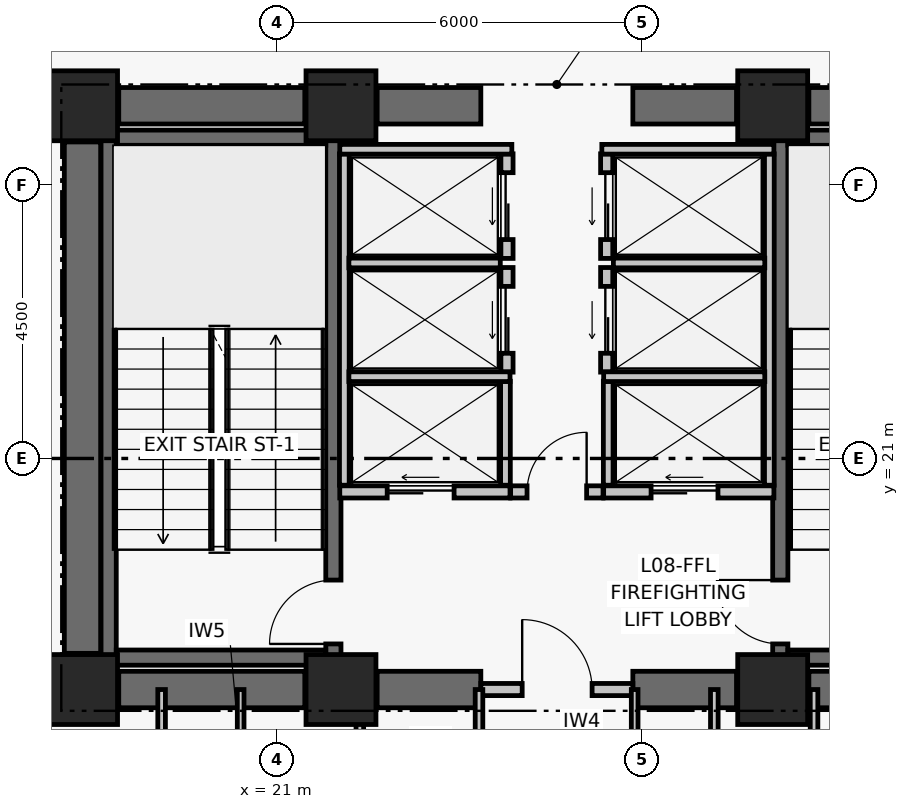
"""IFC4 building model, lengths in metres.
Left out: names, types, materials, properties, quantities, classifications, styles, units other than length and angle.
Written with IfcOpenShell. Run it as: python <this file> out.ifc"""

import sys

from ifc_helpers import new_model, si_unit, direction, frame, frame_2d, origin, origin_2d, place, context, subcontext, project, spatial, rectangle, extrude, element, fill, save


model = new_model("IFC4")
c1 = context("Model", 3, precision=1e-05, world=origin(), true_north=direction((0.0, 1.0)))
c2 = subcontext(c1, "Body", "Model", "MODEL_VIEW")
j1 = project(units=[si_unit("LENGTHUNIT", "METRE"), si_unit("PLANEANGLEUNIT", "RADIAN")], contexts=[c1])
p1 = place(None, origin())
s1 = spatial("IfcSite", under=j1, at=p1, CompositionType="ELEMENT")
p2 = place(p1, origin())
s2 = spatial("IfcBuilding", under=s1, at=p2, CompositionType="ELEMENT")
p3 = place(p2, frame((0.0, 0.0, 38.76)))
s3 = spatial("IfcBuildingStorey", under=s2, at=p3, CompositionType="ELEMENT", Elevation=38.76)
for number, where, z_axis, x_axis in (
    (1, (17.8, 17.2, 0.0), (0.0, 0.0, 1.0), (1.0, 0.0, 0.0)),
    (2, (22.05, 17.2, 0.0), (0.0, 0.0, 1.0), (1.0, 0.0, 0.0)),
    (3, (29.15, 17.2, 0.0), (0.0, 0.0, 1.0), (1.0, 0.0, 0.0)),
    (4, (17.8, 26.8, 0.0), (0.0, 0.0, 1.0), (1.0, 0.0, 0.0)),
    (5, (22.05, 26.8, 0.0), (0.0, 0.0, 1.0), (1.0, 0.0, 0.0)),
    (6, (29.15, 26.8, 0.0), (0.0, 0.0, 1.0), (1.0, 0.0, 0.0)),
):
    element("IfcColumn", number, at=place(p3, frame(where, z_axis=z_axis, x_axis=x_axis)), inside=s3, PredefinedType="COLUMN", context=c2, shape_type="SweptSolid", body=[
        extrude(rectangle(XDim=1.15, YDim=1.15, at=origin_2d()), origin(), (0.0, 0.0, 1.0), 3.72),
    ])
p4 = place(p3, frame((18.395, 17.2, 0.0), z_axis=(0.0, 0.0, 1.0), x_axis=(1.0, 0.0, 0.0)))
e7 = element("IfcWall", 7, at=p4, inside=s3, PredefinedType="SHEAR", context=c2, shape_type="SweptSolid", body=[
    extrude(rectangle(XDim=3.06, YDim=0.6, at=frame_2d((1.53, 0.0))), origin(), (0.0, 0.0, 1.0), 3.47),
])
p5 = place(p3, frame((22.645, 17.2, 0.0), z_axis=(0.0, 0.0, 1.0), x_axis=(1.0, 0.0, 0.0)))
e8 = element("IfcWall", 8, at=p5, inside=s3, PredefinedType="SHEAR", context=c2, shape_type="SweptSolid", body=[
    extrude(rectangle(XDim=1.705, YDim=0.6, at=frame_2d((0.853, 0.0))), origin(), (0.0, 0.0, 1.0), 3.47),
])
p6 = place(p3, frame((26.85, 17.2, 0.0), z_axis=(0.0, 0.0, 1.0), x_axis=(1.0, 0.0, 0.0)))
e9 = element("IfcWall", 9, at=p6, inside=s3, PredefinedType="SHEAR", context=c2, shape_type="SweptSolid", body=[
    extrude(rectangle(XDim=1.705, YDim=0.6, at=frame_2d((0.853, 0.0))), origin(), (0.0, 0.0, 1.0), 3.47),
])
p7 = place(p3, frame((29.745, 17.2, 0.0), z_axis=(0.0, 0.0, 1.0), x_axis=(1.0, 0.0, 0.0)))
e10 = element("IfcWall", 10, at=p7, inside=s3, PredefinedType="SHEAR", context=c2, shape_type="SweptSolid", body=[
    extrude(rectangle(XDim=3.06, YDim=0.6, at=frame_2d((1.53, 0.0))), origin(), (0.0, 0.0, 1.0), 3.47),
])
p8 = place(p3, frame((18.395, 26.8, 0.0), z_axis=(0.0, 0.0, 1.0), x_axis=(1.0, 0.0, 0.0)))
e11 = element("IfcWall", 11, at=p8, inside=s3, PredefinedType="SHEAR", context=c2, shape_type="SweptSolid", body=[
    extrude(rectangle(XDim=3.06, YDim=0.6, at=frame_2d((1.53, 0.0))), origin(), (0.0, 0.0, 1.0), 3.47),
])
p9 = place(p3, frame((22.645, 26.8, 0.0), z_axis=(0.0, 0.0, 1.0), x_axis=(1.0, 0.0, 0.0)))
e12 = element("IfcWall", 12, at=p9, inside=s3, PredefinedType="SHEAR", context=c2, shape_type="SweptSolid", body=[
    extrude(rectangle(XDim=1.705, YDim=0.6, at=frame_2d((0.853, 0.0))), origin(), (0.0, 0.0, 1.0), 3.47),
])
p10 = place(p3, frame((26.85, 26.8, 0.0), z_axis=(0.0, 0.0, 1.0), x_axis=(1.0, 0.0, 0.0)))
e13 = element("IfcWall", 13, at=p10, inside=s3, PredefinedType="SHEAR", context=c2, shape_type="SweptSolid", body=[
    extrude(rectangle(XDim=1.705, YDim=0.6, at=frame_2d((0.853, 0.0))), origin(), (0.0, 0.0, 1.0), 3.47),
])
p11 = place(p3, frame((29.745, 26.8, 0.0), z_axis=(0.0, 0.0, 1.0), x_axis=(1.0, 0.0, 0.0)))
e14 = element("IfcWall", 14, at=p11, inside=s3, PredefinedType="SHEAR", context=c2, shape_type="SweptSolid", body=[
    extrude(rectangle(XDim=3.06, YDim=0.6, at=frame_2d((1.53, 0.0))), origin(), (0.0, 0.0, 1.0), 3.47),
])
p12 = place(p3, frame((17.8, 17.795, 0.0), z_axis=(0.0, 0.0, 1.0), x_axis=(0.0, 1.0, 0.0)))
e15 = element("IfcWall", 15, at=p12, inside=s3, PredefinedType="SHEAR", context=c2, shape_type="SweptSolid", body=[
    extrude(rectangle(XDim=8.41, YDim=0.6, at=frame_2d((4.205, 0.0))), origin(), (0.0, 0.0, 1.0), 3.47),
])
p13 = place(p3, frame((18.229, 17.6, 0.0), z_axis=(0.0, 0.0, 1.0), x_axis=(0.0, 1.0, 0.0)))
e16 = element("IfcWall", 16, at=p13, inside=s3, PredefinedType="SHEAR", context=c2, shape_type="SweptSolid", body=[
    extrude(rectangle(XDim=8.8, YDim=0.25, at=frame_2d((4.4, 0.0))), origin(), (0.0, 0.0, 1.0), 3.47),
])
p14 = place(p3, frame((21.925, 17.6, 0.0), z_axis=(0.0, 0.0, 1.0), x_axis=(0.0, 1.0, 0.0)))
e17 = element("IfcWall", 17, at=p14, inside=s3, PredefinedType="SHEAR", context=c2, shape_type="SweptSolid", body=[
    extrude(rectangle(XDim=8.8, YDim=0.25, at=frame_2d((4.4, 0.0))), origin(), (0.0, 0.0, 1.0), 3.47),
])
p15 = place(p14, frame((0.35, 0.0, 0.0)))
e18 = element("IfcOpeningElement", 18, at=p15, cuts=e17, PredefinedType="OPENING", context=c2, shape_type="SweptSolid", body=[
    extrude(rectangle(XDim=1.05, YDim=2.08, at=frame_2d((0.525, 1.04))), frame((0.0, 0.135, 0.0), z_axis=(0.0, -1.0, 0.0), x_axis=(1.0, 0.0, 0.0)), (0.0, 0.0, 1.0), 0.27),
])
for number, where, z_axis, x_axis in (
    (19, (18.354, 17.725, 0.0), (0.0, 0.0, 1.0), (1.0, 0.0, 0.0)),
    (20, (18.354, 26.275, 0.0), (0.0, 0.0, 1.0), (1.0, 0.0, 0.0)),
):
    element("IfcWall", number, at=place(p3, frame(where, z_axis=z_axis, x_axis=x_axis)), inside=s3, PredefinedType="SHEAR", context=c2, shape_type="SweptSolid", body=[
        extrude(rectangle(XDim=3.446, YDim=0.25, at=frame_2d((1.723, 0.0))), origin(), (0.0, 0.0, 1.0), 3.47),
    ])
p16 = place(p3, frame((29.275, 17.6, 0.0), z_axis=(0.0, 0.0, 1.0), x_axis=(0.0, 1.0, 0.0)))
e21 = element("IfcWall", 21, at=p16, inside=s3, PredefinedType="SHEAR", context=c2, shape_type="SweptSolid", body=[
    extrude(rectangle(XDim=8.8, YDim=0.25, at=frame_2d((4.4, 0.0))), origin(), (0.0, 0.0, 1.0), 3.47),
])
p17 = place(p16, frame((0.35, 0.0, 0.0)))
e22 = element("IfcOpeningElement", 22, at=p17, cuts=e21, PredefinedType="OPENING", context=c2, shape_type="SweptSolid", body=[
    extrude(rectangle(XDim=1.05, YDim=2.08, at=frame_2d((0.525, 1.04))), frame((0.0, 0.135, 0.0), z_axis=(0.0, -1.0, 0.0), x_axis=(1.0, 0.0, 0.0)), (0.0, 0.0, 1.0), 0.27),
])
for number, where, z_axis, x_axis in (
    (23, (29.4, 17.725, 0.0), (0.0, 0.0, 1.0), (1.0, 0.0, 0.0)),
    (24, (29.4, 26.275, 0.0), (0.0, 0.0, 1.0), (1.0, 0.0, 0.0)),
):
    element("IfcWall", number, at=place(p3, frame(where, z_axis=z_axis, x_axis=x_axis)), inside=s3, PredefinedType="SHEAR", context=c2, shape_type="SweptSolid", body=[
        extrude(rectangle(XDim=3.446, YDim=0.25, at=frame_2d((1.723, 0.0))), origin(), (0.0, 0.0, 1.0), 3.47),
    ])
p18 = place(p3, frame((24.35, 17.2, 0.0), z_axis=(0.0, 0.0, 1.0), x_axis=(1.0, 0.0, 0.0)))
e25 = element("IfcWall", 25, at=p18, inside=s3, PredefinedType="PARTITIONING", context=c2, shape_type="SweptSolid", body=[
    extrude(rectangle(XDim=2.5, YDim=0.2, at=frame_2d((1.25, 0.0))), origin(), (0.0, 0.0, 1.0), 2.6),
])
p19 = place(p18, frame((0.68, 0.0, 0.0)))
e26 = element("IfcOpeningElement", 26, at=p19, cuts=e25, PredefinedType="OPENING", context=c2, shape_type="SweptSolid", body=[
    extrude(rectangle(XDim=1.15, YDim=2.08, at=frame_2d((0.575, 1.04))), frame((0.0, 0.11, 0.0), z_axis=(0.0, -1.0, 0.0), x_axis=(1.0, 0.0, 0.0)), (0.0, 0.0, 1.0), 0.22),
])
p20 = place(p3, frame((24.84, 20.45, 0.0), z_axis=(0.0, 0.0, 1.0), x_axis=(1.0, 0.0, 0.0)))
e27 = element("IfcWall", 27, at=p20, inside=s3, PredefinedType="PARTITIONING", context=c2, shape_type="SweptSolid", body=[
    extrude(rectangle(XDim=1.52, YDim=0.2, at=frame_2d((0.76, 0.0))), origin(), (0.0, 0.0, 1.0), 3.47),
])
p21 = place(p20, frame((0.27, 0.0, 0.0)))
e28 = element("IfcOpeningElement", 28, at=p21, cuts=e27, PredefinedType="OPENING", context=c2, shape_type="SweptSolid", body=[
    extrude(rectangle(XDim=0.98, YDim=2.06, at=frame_2d((0.49, 1.03))), frame((0.0, 0.11, 0.0), z_axis=(0.0, -1.0, 0.0), x_axis=(1.0, 0.0, 0.0)), (0.0, 0.0, 1.0), 0.22),
])
p22 = place(p3, frame((22.03, 20.45, 0.0), z_axis=(0.0, 0.0, 1.0), x_axis=(1.0, 0.0, 0.0)))
e29 = element("IfcWall", 29, at=p22, inside=s3, PredefinedType="PARTITIONING", context=c2, shape_type="SweptSolid", body=[
    extrude(rectangle(XDim=2.8, YDim=0.2, at=frame_2d((1.4, 0.0))), origin(), (0.0, 0.0, 1.0), 3.47),
])
p23 = place(p22, frame((0.78, 0.0, 0.0)))
e30 = element("IfcOpeningElement", 30, at=p23, cuts=e29, PredefinedType="OPENING", context=c2, shape_type="SweptSolid", body=[
    extrude(rectangle(XDim=1.1, YDim=2.08, at=frame_2d((0.55, 1.04))), frame((0.0, 0.11, 0.0), z_axis=(0.0, -1.0, 0.0), x_axis=(1.0, 0.0, 0.0)), (0.0, 0.0, 1.0), 0.22),
])
p24 = place(p3, frame((26.37, 20.45, 0.0), z_axis=(0.0, 0.0, 1.0), x_axis=(1.0, 0.0, 0.0)))
e31 = element("IfcWall", 31, at=p24, inside=s3, PredefinedType="PARTITIONING", context=c2, shape_type="SweptSolid", body=[
    extrude(rectangle(XDim=2.8, YDim=0.2, at=frame_2d((1.4, 0.0))), origin(), (0.0, 0.0, 1.0), 3.47),
])
p25 = place(p24, frame((0.78, 0.0, 0.0)))
e32 = element("IfcOpeningElement", 32, at=p25, cuts=e31, PredefinedType="OPENING", context=c2, shape_type="SweptSolid", body=[
    extrude(rectangle(XDim=1.1, YDim=2.08, at=frame_2d((0.55, 1.04))), frame((0.0, 0.11, 0.0), z_axis=(0.0, -1.0, 0.0), x_axis=(1.0, 0.0, 0.0)), (0.0, 0.0, 1.0), 0.22),
])
p26 = place(p3, frame((24.78, 22.42, 0.0), z_axis=(0.0, 0.0, 1.0), x_axis=(0.0, 1.0, 0.0)))
e33 = element("IfcWall", 33, at=p26, inside=s3, PredefinedType="PARTITIONING", context=c2, shape_type="SweptSolid", body=[
    extrude(rectangle(XDim=1.72, YDim=0.2, at=frame_2d((0.86, 0.0))), origin(), (0.0, 0.0, 1.0), 3.47),
])
p27 = place(p26, frame((0.31, 0.0, 0.0)))
e34 = element("IfcOpeningElement", 34, at=p27, cuts=e33, PredefinedType="OPENING", context=c2, shape_type="SweptSolid", body=[
    extrude(rectangle(XDim=1.1, YDim=2.08, at=frame_2d((0.55, 1.04))), frame((0.0, 0.11, 0.0), z_axis=(0.0, -1.0, 0.0), x_axis=(1.0, 0.0, 0.0)), (0.0, 0.0, 1.0), 0.22),
])
p28 = place(p3, frame((24.78, 24.29, 0.0), z_axis=(0.0, 0.0, 1.0), x_axis=(0.0, 1.0, 0.0)))
e35 = element("IfcWall", 35, at=p28, inside=s3, PredefinedType="PARTITIONING", context=c2, shape_type="SweptSolid", body=[
    extrude(rectangle(XDim=1.72, YDim=0.2, at=frame_2d((0.86, 0.0))), origin(), (0.0, 0.0, 1.0), 3.47),
])
p29 = place(p28, frame((0.31, 0.0, 0.0)))
e36 = element("IfcOpeningElement", 36, at=p29, cuts=e35, PredefinedType="OPENING", context=c2, shape_type="SweptSolid", body=[
    extrude(rectangle(XDim=1.1, YDim=2.08, at=frame_2d((0.55, 1.04))), frame((0.0, 0.11, 0.0), z_axis=(0.0, -1.0, 0.0), x_axis=(1.0, 0.0, 0.0)), (0.0, 0.0, 1.0), 0.22),
])
p30 = place(p3, frame((26.42, 22.42, 0.0), z_axis=(0.0, 0.0, 1.0), x_axis=(0.0, 1.0, 0.0)))
e37 = element("IfcWall", 37, at=p30, inside=s3, PredefinedType="PARTITIONING", context=c2, shape_type="SweptSolid", body=[
    extrude(rectangle(XDim=1.72, YDim=0.2, at=frame_2d((0.86, 0.0))), origin(), (0.0, 0.0, 1.0), 3.47),
])
p31 = place(p30, frame((0.31, 0.0, 0.0)))
e38 = element("IfcOpeningElement", 38, at=p31, cuts=e37, PredefinedType="OPENING", context=c2, shape_type="SweptSolid", body=[
    extrude(rectangle(XDim=1.1, YDim=2.08, at=frame_2d((0.55, 1.04))), frame((0.0, 0.11, 0.0), z_axis=(0.0, -1.0, 0.0), x_axis=(1.0, 0.0, 0.0)), (0.0, 0.0, 1.0), 0.22),
])
p32 = place(p3, frame((26.42, 24.29, 0.0), z_axis=(0.0, 0.0, 1.0), x_axis=(0.0, 1.0, 0.0)))
e39 = element("IfcWall", 39, at=p32, inside=s3, PredefinedType="PARTITIONING", context=c2, shape_type="SweptSolid", body=[
    extrude(rectangle(XDim=1.72, YDim=0.2, at=frame_2d((0.86, 0.0))), origin(), (0.0, 0.0, 1.0), 3.47),
])
p33 = place(p32, frame((0.31, 0.0, 0.0)))
e40 = element("IfcOpeningElement", 40, at=p33, cuts=e39, PredefinedType="OPENING", context=c2, shape_type="SweptSolid", body=[
    extrude(rectangle(XDim=1.1, YDim=2.08, at=frame_2d((0.55, 1.04))), frame((0.0, 0.11, 0.0), z_axis=(0.0, -1.0, 0.0), x_axis=(1.0, 0.0, 0.0)), (0.0, 0.0, 1.0), 0.22),
])
p34 = place(p3, frame((22.105, 20.56, 0.0), z_axis=(0.0, 0.0, 1.0), x_axis=(0.0, 1.0, 0.0)))
e41 = element("IfcWall", 41, at=p34, inside=s3, PredefinedType="PARTITIONING", context=c2, shape_type="SweptSolid", body=[
    extrude(rectangle(XDim=5.45, YDim=0.16, at=frame_2d((2.725, 0.0))), origin(), (0.0, 0.0, 1.0), 3.47),
])
p35 = place(p3, frame((24.755, 20.56, 0.0), z_axis=(0.0, 0.0, 1.0), x_axis=(0.0, 1.0, 0.0)))
e42 = element("IfcWall", 42, at=p35, inside=s3, PredefinedType="PARTITIONING", context=c2, shape_type="SweptSolid", body=[
    extrude(rectangle(XDim=1.71, YDim=0.16, at=frame_2d((0.855, 0.0))), origin(), (0.0, 0.0, 1.0), 3.47),
])
p36 = place(p3, frame((22.18, 22.345, 0.0), z_axis=(0.0, 0.0, 1.0), x_axis=(1.0, 0.0, 0.0)))
e43 = element("IfcWall", 43, at=p36, inside=s3, PredefinedType="PARTITIONING", context=c2, shape_type="SweptSolid", body=[
    extrude(rectangle(XDim=2.65, YDim=0.16, at=frame_2d((1.325, 0.0))), origin(), (0.0, 0.0, 1.0), 3.47),
])
p37 = place(p3, frame((22.18, 24.215, 0.0), z_axis=(0.0, 0.0, 1.0), x_axis=(1.0, 0.0, 0.0)))
e44 = element("IfcWall", 44, at=p37, inside=s3, PredefinedType="PARTITIONING", context=c2, shape_type="SweptSolid", body=[
    extrude(rectangle(XDim=2.49, YDim=0.16, at=frame_2d((1.245, 0.0))), origin(), (0.0, 0.0, 1.0), 3.47),
])
p38 = place(p3, frame((22.03, 26.085, 0.0), z_axis=(0.0, 0.0, 1.0), x_axis=(1.0, 0.0, 0.0)))
e45 = element("IfcWall", 45, at=p38, inside=s3, PredefinedType="PARTITIONING", context=c2, shape_type="SweptSolid", body=[
    extrude(rectangle(XDim=2.83, YDim=0.16, at=frame_2d((1.415, 0.0))), origin(), (0.0, 0.0, 1.0), 3.47),
])
p39 = place(p3, frame((29.095, 20.56, 0.0), z_axis=(0.0, 0.0, 1.0), x_axis=(0.0, 1.0, 0.0)))
e46 = element("IfcWall", 46, at=p39, inside=s3, PredefinedType="PARTITIONING", context=c2, shape_type="SweptSolid", body=[
    extrude(rectangle(XDim=5.45, YDim=0.16, at=frame_2d((2.725, 0.0))), origin(), (0.0, 0.0, 1.0), 3.47),
])
p40 = place(p3, frame((26.445, 20.56, 0.0), z_axis=(0.0, 0.0, 1.0), x_axis=(0.0, 1.0, 0.0)))
e47 = element("IfcWall", 47, at=p40, inside=s3, PredefinedType="PARTITIONING", context=c2, shape_type="SweptSolid", body=[
    extrude(rectangle(XDim=1.71, YDim=0.16, at=frame_2d((0.855, 0.0))), origin(), (0.0, 0.0, 1.0), 3.47),
])
p41 = place(p3, frame((26.37, 22.345, 0.0), z_axis=(0.0, 0.0, 1.0), x_axis=(1.0, 0.0, 0.0)))
e48 = element("IfcWall", 48, at=p41, inside=s3, PredefinedType="PARTITIONING", context=c2, shape_type="SweptSolid", body=[
    extrude(rectangle(XDim=2.65, YDim=0.16, at=frame_2d((1.325, 0.0))), origin(), (0.0, 0.0, 1.0), 3.47),
])
p42 = place(p3, frame((26.53, 24.215, 0.0), z_axis=(0.0, 0.0, 1.0), x_axis=(1.0, 0.0, 0.0)))
e49 = element("IfcWall", 49, at=p42, inside=s3, PredefinedType="PARTITIONING", context=c2, shape_type="SweptSolid", body=[
    extrude(rectangle(XDim=2.49, YDim=0.16, at=frame_2d((1.245, 0.0))), origin(), (0.0, 0.0, 1.0), 3.47),
])
p43 = place(p3, frame((26.34, 26.085, 0.0), z_axis=(0.0, 0.0, 1.0), x_axis=(1.0, 0.0, 0.0)))
e50 = element("IfcWall", 50, at=p43, inside=s3, PredefinedType="PARTITIONING", context=c2, shape_type="SweptSolid", body=[
    extrude(rectangle(XDim=2.83, YDim=0.16, at=frame_2d((1.415, 0.0))), origin(), (0.0, 0.0, 1.0), 3.47),
])
p44 = place(p3, frame((19.1, 14.95, 0.0), z_axis=(0.0, 0.0, 1.0), x_axis=(0.0, 1.0, 0.0)))
e51 = element("IfcWall", 51, at=p44, inside=s3, PredefinedType="PARTITIONING", context=c2, shape_type="SweptSolid", body=[
    extrude(rectangle(XDim=2.25, YDim=0.125, at=frame_2d((1.125, 0.0))), origin(), (0.0, 0.0, 1.0), 2.6),
])
p45 = place(p3, frame((20.4, 14.95, 0.0), z_axis=(0.0, 0.0, 1.0), x_axis=(0.0, 1.0, 0.0)))
e52 = element("IfcWall", 52, at=p45, inside=s3, PredefinedType="PARTITIONING", context=c2, shape_type="SweptSolid", body=[
    extrude(rectangle(XDim=2.25, YDim=0.11, at=frame_2d((1.125, 0.0))), origin(), (0.0, 0.0, 1.0), 2.6),
])
for number, where, z_axis, x_axis in (
    (53, (22.36, 14.95, 0.0), (0.0, 0.0, 1.0), (0.0, 1.0, 0.0)),
    (54, (24.32, 14.95, 0.0), (0.0, 0.0, 1.0), (0.0, 1.0, 0.0)),
):
    element("IfcWall", number, at=place(p3, frame(where, z_axis=z_axis, x_axis=x_axis)), inside=s3, PredefinedType="PARTITIONING", context=c2, shape_type="SweptSolid", body=[
        extrude(rectangle(XDim=2.25, YDim=0.125, at=frame_2d((1.125, 0.0))), origin(), (0.0, 0.0, 1.0), 2.6),
    ])
p46 = place(p3, frame((26.88, 14.95, 0.0), z_axis=(0.0, 0.0, 1.0), x_axis=(0.0, 1.0, 0.0)))
e55 = element("IfcWall", 55, at=p46, inside=s3, PredefinedType="PARTITIONING", context=c2, shape_type="SweptSolid", body=[
    extrude(rectangle(XDim=2.25, YDim=0.11, at=frame_2d((1.125, 0.0))), origin(), (0.0, 0.0, 1.0), 2.6),
])
for number, where, z_axis, x_axis in (
    (56, (28.19, 14.95, 0.0), (0.0, 0.0, 1.0), (0.0, 1.0, 0.0)),
    (57, (29.83, 14.95, 0.0), (0.0, 0.0, 1.0), (0.0, 1.0, 0.0)),
):
    element("IfcWall", number, at=place(p3, frame(where, z_axis=z_axis, x_axis=x_axis)), inside=s3, PredefinedType="PARTITIONING", context=c2, shape_type="SweptSolid", body=[
        extrude(rectangle(XDim=2.25, YDim=0.125, at=frame_2d((1.125, 0.0))), origin(), (0.0, 0.0, 1.0), 2.6),
    ])
p47 = place(p15, origin())
e58 = element("IfcDoor", 58, at=p47, inside=s3, OperationType="SINGLE_SWING_LEFT", PredefinedType="DOOR", context=c2, shape_type="SweptSolid", body=[
    extrude(rectangle(XDim=1.05, YDim=2.08, at=frame_2d((0.525, 1.04))), frame((0.0, 0.025, 0.0), z_axis=(0.0, -1.0, 0.0), x_axis=(1.0, 0.0, 0.0)), (0.0, 0.0, 1.0), 0.05),
])
fill(e18, e58)
p48 = place(p17, origin())
e59 = element("IfcDoor", 59, at=p48, inside=s3, OperationType="SINGLE_SWING_RIGHT", PredefinedType="DOOR", context=c2, shape_type="SweptSolid", body=[
    extrude(rectangle(XDim=1.05, YDim=2.08, at=frame_2d((0.525, 1.04))), frame((0.0, 0.025, 0.0), z_axis=(0.0, -1.0, 0.0), x_axis=(1.0, 0.0, 0.0)), (0.0, 0.0, 1.0), 0.05),
])
fill(e22, e59)
p49 = place(p19, origin())
e60 = element("IfcDoor", 60, at=p49, inside=s3, OperationType="SINGLE_SWING_LEFT", PredefinedType="DOOR", context=c2, shape_type="SweptSolid", body=[
    extrude(rectangle(XDim=1.15, YDim=2.08, at=frame_2d((0.575, 1.04))), frame((0.0, 0.025, 0.0), z_axis=(0.0, -1.0, 0.0), x_axis=(1.0, 0.0, 0.0)), (0.0, 0.0, 1.0), 0.05),
])
fill(e26, e60)
p50 = place(p21, origin())
e61 = element("IfcDoor", 61, at=p50, inside=s3, OperationType="SINGLE_SWING_RIGHT", PredefinedType="DOOR", context=c2, shape_type="SweptSolid", body=[
    extrude(rectangle(XDim=0.98, YDim=2.06, at=frame_2d((0.49, 1.03))), frame((0.0, 0.025, 0.0), z_axis=(0.0, -1.0, 0.0), x_axis=(1.0, 0.0, 0.0)), (0.0, 0.0, 1.0), 0.05),
])
fill(e28, e61)
p51 = place(p23, origin())
e62 = element("IfcDoor", 62, at=p51, inside=s3, OperationType="DOUBLE_DOOR_SLIDING", PredefinedType="DOOR", context=c2, shape_type="SweptSolid", body=[
    extrude(rectangle(XDim=1.1, YDim=2.08, at=frame_2d((0.55, 1.04))), frame((0.0, 0.025, 0.0), z_axis=(0.0, -1.0, 0.0), x_axis=(1.0, 0.0, 0.0)), (0.0, 0.0, 1.0), 0.05),
])
fill(e30, e62)
p52 = place(p25, origin())
e63 = element("IfcDoor", 63, at=p52, inside=s3, OperationType="DOUBLE_DOOR_SLIDING", PredefinedType="DOOR", context=c2, shape_type="SweptSolid", body=[
    extrude(rectangle(XDim=1.1, YDim=2.08, at=frame_2d((0.55, 1.04))), frame((0.0, 0.025, 0.0), z_axis=(0.0, -1.0, 0.0), x_axis=(1.0, 0.0, 0.0)), (0.0, 0.0, 1.0), 0.05),
])
fill(e32, e63)
p53 = place(p27, origin())
e64 = element("IfcDoor", 64, at=p53, inside=s3, OperationType="DOUBLE_DOOR_SLIDING", PredefinedType="DOOR", context=c2, shape_type="SweptSolid", body=[
    extrude(rectangle(XDim=1.1, YDim=2.08, at=frame_2d((0.55, 1.04))), frame((0.0, 0.025, 0.0), z_axis=(0.0, -1.0, 0.0), x_axis=(1.0, 0.0, 0.0)), (0.0, 0.0, 1.0), 0.05),
])
fill(e34, e64)
p54 = place(p29, origin())
e65 = element("IfcDoor", 65, at=p54, inside=s3, OperationType="DOUBLE_DOOR_SLIDING", PredefinedType="DOOR", context=c2, shape_type="SweptSolid", body=[
    extrude(rectangle(XDim=1.1, YDim=2.08, at=frame_2d((0.55, 1.04))), frame((0.0, 0.025, 0.0), z_axis=(0.0, -1.0, 0.0), x_axis=(1.0, 0.0, 0.0)), (0.0, 0.0, 1.0), 0.05),
])
fill(e36, e65)
p55 = place(p31, origin())
e66 = element("IfcDoor", 66, at=p55, inside=s3, OperationType="DOUBLE_DOOR_SLIDING", PredefinedType="DOOR", context=c2, shape_type="SweptSolid", body=[
    extrude(rectangle(XDim=1.1, YDim=2.08, at=frame_2d((0.55, 1.04))), frame((0.0, 0.025, 0.0), z_axis=(0.0, -1.0, 0.0), x_axis=(1.0, 0.0, 0.0)), (0.0, 0.0, 1.0), 0.05),
])
fill(e38, e66)
p56 = place(p33, origin())
e67 = element("IfcDoor", 67, at=p56, inside=s3, OperationType="DOUBLE_DOOR_SLIDING", PredefinedType="DOOR", context=c2, shape_type="SweptSolid", body=[
    extrude(rectangle(XDim=1.1, YDim=2.08, at=frame_2d((0.55, 1.04))), frame((0.0, 0.025, 0.0), z_axis=(0.0, -1.0, 0.0), x_axis=(1.0, 0.0, 0.0)), (0.0, 0.0, 1.0), 0.05),
])
fill(e40, e67)
save(model, sys.argv[1])
